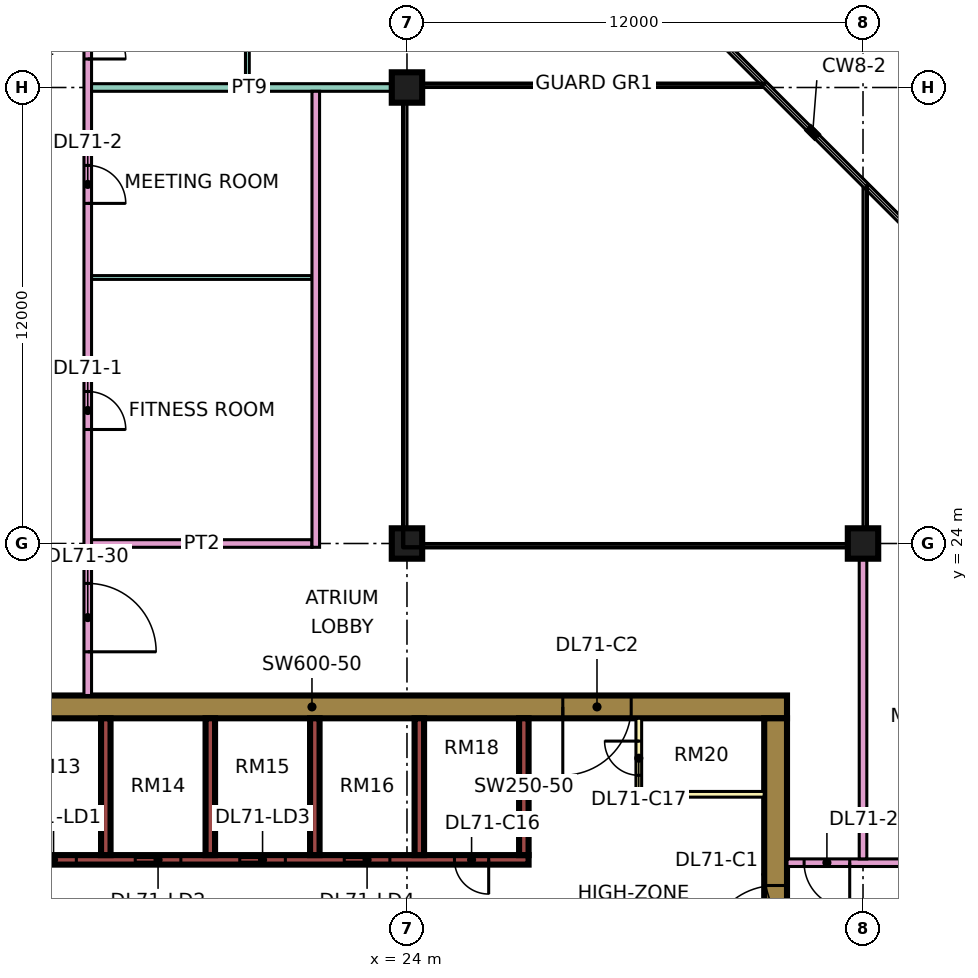
"""IFC4 building model, lengths in metres.
Left out: names, types, materials, properties, quantities, classifications, styles, units other than length and angle.
Written with IfcOpenShell. Run it as: python <this file> out.ifc"""

import sys

from ifc_helpers import new_model, si_unit, direction, frame, frame_2d, origin, origin_2d, place, context, subcontext, project, spatial, rectangle, extrude, element, fill, save


model = new_model("IFC4")
c1 = context("Model", 3, precision=1e-05, world=origin(), true_north=direction((0.0, 1.0)))
c2 = subcontext(c1, "Body", "Model", "MODEL_VIEW")
j1 = project(units=[si_unit("LENGTHUNIT", "METRE"), si_unit("PLANEANGLEUNIT", "RADIAN")], contexts=[c1])
p1 = place(None, origin())
s1 = spatial("IfcSite", under=j1, at=p1, CompositionType="ELEMENT")
p2 = place(p1, origin())
s2 = spatial("IfcBuilding", under=s1, at=p2, CompositionType="ELEMENT")
p3 = place(p2, frame((0.0, 0.0, 303.4)))
s3 = spatial("IfcBuildingStorey", under=s2, at=p3, CompositionType="ELEMENT", Elevation=303.4)
for number, where, z_axis, x_axis in (
    (1, (24.0, 24.0, 0.0), (0.0, 0.0, 1.0), (1.0, 0.0, 0.0)),
    (2, (24.0, 36.0, 0.0), (0.0, 0.0, 1.0), (1.0, 0.0, 0.0)),
    (3, (36.0, 24.0, 0.0), (0.0, 0.0, 1.0), (1.0, 0.0, 0.0)),
):
    element("IfcColumn", number, at=place(p3, frame(where, z_axis=z_axis, x_axis=x_axis)), inside=s3, PredefinedType="COLUMN", context=c2, shape_type="SweptSolid", body=[
        extrude(rectangle(XDim=0.8, YDim=0.8, at=origin_2d()), origin(), (0.0, 0.0, 1.0), 3.75),
    ])
p4 = place(p3, frame((9.0, 19.7, 0.0), z_axis=(0.0, 0.0, 1.0), x_axis=(1.0, 0.0, 0.0)))
e4 = element("IfcWall", 4, at=p4, inside=s3, PredefinedType="SHEAR", context=c2, shape_type="SweptSolid", body=[
    extrude(rectangle(XDim=25.0, YDim=0.6, at=frame_2d((12.5, 0.0))), origin(), (0.0, 0.0, 1.0), 3.75),
])
p5 = place(p4, frame((19.1, 0.0, 0.0)))
e5 = element("IfcOpeningElement", 5, at=p5, cuts=e4, PredefinedType="OPENING", context=c2, shape_type="SweptSolid", body=[
    extrude(rectangle(XDim=1.8, YDim=2.4, at=frame_2d((0.9, 1.2))), frame((0.0, 0.31, 0.0), z_axis=(0.0, -1.0, 0.0), x_axis=(1.0, 0.0, 0.0)), (0.0, 0.0, 1.0), 0.62),
])
p6 = place(p3, frame((33.7, 7.6, 0.0), z_axis=(0.0, 0.0, 1.0), x_axis=(0.0, 1.0, 0.0)))
e6 = element("IfcWall", 6, at=p6, inside=s3, PredefinedType="SHEAR", context=c2, shape_type="SweptSolid", body=[
    extrude(rectangle(XDim=11.8, YDim=0.6, at=frame_2d((5.9, 0.0))), origin(), (0.0, 0.0, 1.0), 3.75),
])
p7 = place(p6, frame((5.6, 0.0, 0.0)))
e7 = element("IfcOpeningElement", 7, at=p7, cuts=e6, PredefinedType="OPENING", context=c2, shape_type="SweptSolid", body=[
    extrude(rectangle(XDim=1.8, YDim=2.4, at=frame_2d((0.9, 1.2))), frame((0.0, 0.31, 0.0), z_axis=(0.0, -1.0, 0.0), x_axis=(1.0, 0.0, 0.0)), (0.0, 0.0, 1.0), 0.62),
])
p8 = place(p3, frame((13.45, 15.675, 0.0), z_axis=(0.0, 0.0, 1.0), x_axis=(1.0, 0.0, 0.0)))
e8 = element("IfcWall", 8, at=p8, inside=s3, PredefinedType="SHEAR", context=c2, shape_type="SweptSolid", body=[
    extrude(rectangle(XDim=13.75, YDim=0.25, at=frame_2d((6.875, 0.0))), origin(), (0.0, 0.0, 1.0), 3.75),
])
p9 = place(p8, frame((0.65, 0.0, 0.0)))
e9 = element("IfcOpeningElement", 9, at=p9, cuts=e8, PredefinedType="OPENING", context=c2, shape_type="SweptSolid", body=[
    extrude(rectangle(XDim=1.2, YDim=2.2, at=frame_2d((0.6, 1.1))), frame((0.0, 0.135, 0.0), z_axis=(0.0, -1.0, 0.0), x_axis=(1.0, 0.0, 0.0)), (0.0, 0.0, 1.0), 0.27),
])
p10 = place(p8, frame((3.4, 0.0, 0.0)))
e10 = element("IfcOpeningElement", 10, at=p10, cuts=e8, PredefinedType="OPENING", context=c2, shape_type="SweptSolid", body=[
    extrude(rectangle(XDim=1.2, YDim=2.2, at=frame_2d((0.6, 1.1))), frame((0.0, 0.135, 0.0), z_axis=(0.0, -1.0, 0.0), x_axis=(1.0, 0.0, 0.0)), (0.0, 0.0, 1.0), 0.27),
])
p11 = place(p8, frame((6.15, 0.0, 0.0)))
e11 = element("IfcOpeningElement", 11, at=p11, cuts=e8, PredefinedType="OPENING", context=c2, shape_type="SweptSolid", body=[
    extrude(rectangle(XDim=1.2, YDim=2.2, at=frame_2d((0.6, 1.1))), frame((0.0, 0.135, 0.0), z_axis=(0.0, -1.0, 0.0), x_axis=(1.0, 0.0, 0.0)), (0.0, 0.0, 1.0), 0.27),
])
p12 = place(p8, frame((8.9, 0.0, 0.0)))
e12 = element("IfcOpeningElement", 12, at=p12, cuts=e8, PredefinedType="OPENING", context=c2, shape_type="SweptSolid", body=[
    extrude(rectangle(XDim=1.2, YDim=2.2, at=frame_2d((0.6, 1.1))), frame((0.0, 0.135, 0.0), z_axis=(0.0, -1.0, 0.0), x_axis=(1.0, 0.0, 0.0)), (0.0, 0.0, 1.0), 0.27),
])
p13 = place(p8, frame((11.8, 0.0, 0.0)))
e13 = element("IfcOpeningElement", 13, at=p13, cuts=e8, PredefinedType="OPENING", context=c2, shape_type="SweptSolid", body=[
    extrude(rectangle(XDim=0.9, YDim=2.1, at=frame_2d((0.45, 1.05))), frame((0.0, 0.135, 0.0), z_axis=(0.0, -1.0, 0.0), x_axis=(1.0, 0.0, 0.0)), (0.0, 0.0, 1.0), 0.27),
])
for number, where, z_axis, x_axis in (
    (14, (16.075, 15.8, 0.0), (0.0, 0.0, 1.0), (0.0, 1.0, 0.0)),
    (15, (18.825, 15.8, 0.0), (0.0, 0.0, 1.0), (0.0, 1.0, 0.0)),
    (16, (21.575, 15.8, 0.0), (0.0, 0.0, 1.0), (0.0, 1.0, 0.0)),
    (17, (24.325, 15.8, 0.0), (0.0, 0.0, 1.0), (0.0, 1.0, 0.0)),
    (18, (27.075, 15.8, 0.0), (0.0, 0.0, 1.0), (0.0, 1.0, 0.0)),
):
    element("IfcWall", number, at=place(p3, frame(where, z_axis=z_axis, x_axis=x_axis)), inside=s3, PredefinedType="SHEAR", context=c2, shape_type="SweptSolid", body=[
        extrude(rectangle(XDim=3.6, YDim=0.25, at=frame_2d((1.8, 0.0))), origin(), (0.0, 0.0, 1.0), 3.75),
    ])
p14 = place(p3, frame((30.1, 17.4, 0.0), z_axis=(0.0, 0.0, 1.0), x_axis=(0.0, 1.0, 0.0)))
e19 = element("IfcWall", 19, at=p14, inside=s3, PredefinedType="PARTITIONING", context=c2, shape_type="SweptSolid", body=[
    extrude(rectangle(XDim=2.0, YDim=0.15, at=frame_2d((1.0, 0.0))), origin(), (0.0, 0.0, 1.0), 3.35),
])
p15 = place(p14, frame((0.5, 0.0, 0.0)))
e20 = element("IfcOpeningElement", 20, at=p15, cuts=e19, PredefinedType="OPENING", context=c2, shape_type="SweptSolid", body=[
    extrude(rectangle(XDim=0.9, YDim=2.1, at=frame_2d((0.45, 1.05))), frame((0.0, 0.085, 0.0), z_axis=(0.0, -1.0, 0.0), x_axis=(1.0, 0.0, 0.0)), (0.0, 0.0, 1.0), 0.17),
])
p16 = place(p3, frame((30.1, 17.4, 0.0), z_axis=(0.0, 0.0, 1.0), x_axis=(1.0, 0.0, 0.0)))
e21 = element("IfcWall", 21, at=p16, inside=s3, PredefinedType="PARTITIONING", context=c2, shape_type="SweptSolid", body=[
    extrude(rectangle(XDim=3.3, YDim=0.15, at=frame_2d((1.65, 0.0))), origin(), (0.0, 0.0, 1.0), 3.35),
])
p17 = place(p3, frame((15.6, 20.0, 0.0), z_axis=(0.0, 0.0, 1.0), x_axis=(0.0, 1.0, 0.0)))
e22 = element("IfcWall", 22, at=p17, inside=s3, PredefinedType="PARTITIONING", context=c2, shape_type="SweptSolid", body=[
    extrude(rectangle(XDim=27.775, YDim=0.2, at=frame_2d((13.887, 0.0))), origin(), (0.0, 0.0, 1.0), 3.35),
])
p18 = place(p17, frame((7.0, 0.0, 0.0)))
e23 = element("IfcOpeningElement", 23, at=p18, cuts=e22, PredefinedType="OPENING", context=c2, shape_type="SweptSolid", body=[
    extrude(rectangle(XDim=1.0, YDim=2.1, at=frame_2d((0.5, 1.05))), frame((0.0, 0.11, 0.0), z_axis=(0.0, -1.0, 0.0), x_axis=(1.0, 0.0, 0.0)), (0.0, 0.0, 1.0), 0.22),
])
p19 = place(p17, frame((12.95, 0.0, 0.0)))
e24 = element("IfcOpeningElement", 24, at=p19, cuts=e22, PredefinedType="OPENING", context=c2, shape_type="SweptSolid", body=[
    extrude(rectangle(XDim=1.0, YDim=2.1, at=frame_2d((0.5, 1.05))), frame((0.0, 0.11, 0.0), z_axis=(0.0, -1.0, 0.0), x_axis=(1.0, 0.0, 0.0)), (0.0, 0.0, 1.0), 0.22),
])
p20 = place(p17, frame((16.75, 0.0, 0.0)))
e25 = element("IfcOpeningElement", 25, at=p20, cuts=e22, PredefinedType="OPENING", context=c2, shape_type="SweptSolid", body=[
    extrude(rectangle(XDim=1.0, YDim=2.1, at=frame_2d((0.5, 1.05))), frame((0.0, 0.11, 0.0), z_axis=(0.0, -1.0, 0.0), x_axis=(1.0, 0.0, 0.0)), (0.0, 0.0, 1.0), 0.22),
])
p21 = place(p17, frame((1.15, 0.0, 0.0)))
e26 = element("IfcOpeningElement", 26, at=p21, cuts=e22, PredefinedType="OPENING", context=c2, shape_type="SweptSolid", body=[
    extrude(rectangle(XDim=1.8, YDim=2.1, at=frame_2d((0.9, 1.05))), frame((0.0, 0.11, 0.0), z_axis=(0.0, -1.0, 0.0), x_axis=(1.0, 0.0, 0.0)), (0.0, 0.0, 1.0), 0.22),
])
p22 = place(p17, frame((25.9, 0.0, 0.0)))
e27 = element("IfcOpeningElement", 27, at=p22, cuts=e22, PredefinedType="OPENING", context=c2, shape_type="SweptSolid", body=[
    extrude(rectangle(XDim=1.0, YDim=2.1, at=frame_2d((0.5, 1.05))), frame((0.0, 0.11, 0.0), z_axis=(0.0, -1.0, 0.0), x_axis=(1.0, 0.0, 0.0)), (0.0, 0.0, 1.0), 0.22),
])
p23 = place(p3, frame((15.7, 24.0, 0.0), z_axis=(0.0, 0.0, 1.0), x_axis=(1.0, 0.0, 0.0)))
e28 = element("IfcWall", 28, at=p23, inside=s3, PredefinedType="PARTITIONING", context=c2, shape_type="SweptSolid", body=[
    extrude(rectangle(XDim=5.8, YDim=0.2, at=frame_2d((2.9, 0.0))), origin(), (0.0, 0.0, 1.0), 3.35),
])
p24 = place(p3, frame((15.7, 31.0, 0.0), z_axis=(0.0, 0.0, 1.0), x_axis=(1.0, 0.0, 0.0)))
e29 = element("IfcWall", 29, at=p24, inside=s3, PredefinedType="PARTITIONING", context=c2, shape_type="SweptSolid", body=[
    extrude(rectangle(XDim=5.8, YDim=0.1, at=frame_2d((2.9, 0.0))), origin(), (0.0, 0.0, 1.0), 3.35),
])
p25 = place(p3, frame((15.7, 36.0, 0.0), z_axis=(0.0, 0.0, 1.0), x_axis=(1.0, 0.0, 0.0)))
e30 = element("IfcWall", 30, at=p25, inside=s3, PredefinedType="PARTITIONING", context=c2, shape_type="SweptSolid", body=[
    extrude(rectangle(XDim=8.3, YDim=0.2, at=frame_2d((4.15, 0.0))), origin(), (0.0, 0.0, 1.0), 3.35),
])
p26 = place(p3, frame((19.8, 36.1, 0.0), z_axis=(0.0, 0.0, 1.0), x_axis=(0.0, 1.0, 0.0)))
e31 = element("IfcWall", 31, at=p26, inside=s3, PredefinedType="PARTITIONING", context=c2, shape_type="SweptSolid", body=[
    extrude(rectangle(XDim=5.95, YDim=0.1, at=frame_2d((2.975, 0.0))), origin(), (0.0, 0.0, 1.0), 3.35),
])
p27 = place(p26, frame((0.95, 0.0, 0.0)))
e32 = element("IfcOpeningElement", 32, at=p27, cuts=e31, PredefinedType="OPENING", context=c2, shape_type="SweptSolid", body=[
    extrude(rectangle(XDim=0.9, YDim=2.1, at=frame_2d((0.45, 1.05))), frame((0.0, 0.06, 0.0), z_axis=(0.0, -1.0, 0.0), x_axis=(1.0, 0.0, 0.0)), (0.0, 0.0, 1.0), 0.12),
])
p28 = place(p3, frame((21.6, 23.9, 0.0), z_axis=(0.0, 0.0, 1.0), x_axis=(0.0, 1.0, 0.0)))
e33 = element("IfcWall", 33, at=p28, inside=s3, PredefinedType="PARTITIONING", context=c2, shape_type="SweptSolid", body=[
    extrude(rectangle(XDim=12.0, YDim=0.2, at=frame_2d((6.0, 0.0))), origin(), (0.0, 0.0, 1.0), 3.35),
])
p29 = place(p3, frame((34.0, 15.6, 0.0), z_axis=(0.0, 0.0, 1.0), x_axis=(1.0, 0.0, 0.0)))
e34 = element("IfcWall", 34, at=p29, inside=s3, PredefinedType="PARTITIONING", context=c2, shape_type="SweptSolid", body=[
    extrude(rectangle(XDim=10.35, YDim=0.2, at=frame_2d((5.175, 0.0))), origin(), (0.0, 0.0, 1.0), 3.35),
])
p30 = place(p29, frame((5.6, 0.0, 0.0)))
e35 = element("IfcOpeningElement", 35, at=p30, cuts=e34, PredefinedType="OPENING", context=c2, shape_type="SweptSolid", body=[
    extrude(rectangle(XDim=1.0, YDim=2.1, at=frame_2d((0.5, 1.05))), frame((0.0, 0.11, 0.0), z_axis=(0.0, -1.0, 0.0), x_axis=(1.0, 0.0, 0.0)), (0.0, 0.0, 1.0), 0.22),
])
p31 = place(p29, frame((0.45, 0.0, 0.0)))
e36 = element("IfcOpeningElement", 36, at=p31, cuts=e34, PredefinedType="OPENING", context=c2, shape_type="SweptSolid", body=[
    extrude(rectangle(XDim=1.2, YDim=2.1, at=frame_2d((0.6, 1.05))), frame((0.0, 0.11, 0.0), z_axis=(0.0, -1.0, 0.0), x_axis=(1.0, 0.0, 0.0)), (0.0, 0.0, 1.0), 0.22),
])
p32 = place(p3, frame((36.0, 15.7, 0.0), z_axis=(0.0, 0.0, 1.0), x_axis=(0.0, 1.0, 0.0)))
e37 = element("IfcWall", 37, at=p32, inside=s3, PredefinedType="PARTITIONING", context=c2, shape_type="SweptSolid", body=[
    extrude(rectangle(XDim=8.3, YDim=0.2, at=frame_2d((4.15, 0.0))), origin(), (0.0, 0.0, 1.0), 3.35),
])
p33 = place(p9, origin())
e38 = element("IfcDoor", 38, at=p33, inside=s3, OperationType="DOUBLE_DOOR_SLIDING", PredefinedType="DOOR", context=c2, shape_type="SweptSolid", body=[
    extrude(rectangle(XDim=1.2, YDim=2.2, at=frame_2d((0.6, 1.1))), frame((0.0, 0.025, 0.0), z_axis=(0.0, -1.0, 0.0), x_axis=(1.0, 0.0, 0.0)), (0.0, 0.0, 1.0), 0.05),
])
fill(e9, e38)
p34 = place(p10, origin())
e39 = element("IfcDoor", 39, at=p34, inside=s3, OperationType="DOUBLE_DOOR_SLIDING", PredefinedType="DOOR", context=c2, shape_type="SweptSolid", body=[
    extrude(rectangle(XDim=1.2, YDim=2.2, at=frame_2d((0.6, 1.1))), frame((0.0, 0.025, 0.0), z_axis=(0.0, -1.0, 0.0), x_axis=(1.0, 0.0, 0.0)), (0.0, 0.0, 1.0), 0.05),
])
fill(e10, e39)
p35 = place(p11, origin())
e40 = element("IfcDoor", 40, at=p35, inside=s3, OperationType="DOUBLE_DOOR_SLIDING", PredefinedType="DOOR", context=c2, shape_type="SweptSolid", body=[
    extrude(rectangle(XDim=1.2, YDim=2.2, at=frame_2d((0.6, 1.1))), frame((0.0, 0.025, 0.0), z_axis=(0.0, -1.0, 0.0), x_axis=(1.0, 0.0, 0.0)), (0.0, 0.0, 1.0), 0.05),
])
fill(e11, e40)
p36 = place(p12, origin())
e41 = element("IfcDoor", 41, at=p36, inside=s3, OperationType="DOUBLE_DOOR_SLIDING", PredefinedType="DOOR", context=c2, shape_type="SweptSolid", body=[
    extrude(rectangle(XDim=1.2, YDim=2.2, at=frame_2d((0.6, 1.1))), frame((0.0, 0.025, 0.0), z_axis=(0.0, -1.0, 0.0), x_axis=(1.0, 0.0, 0.0)), (0.0, 0.0, 1.0), 0.05),
])
fill(e12, e41)
p37 = place(p7, origin())
e42 = element("IfcDoor", 42, at=p37, inside=s3, OperationType="DOUBLE_DOOR_SINGLE_SWING", PredefinedType="DOOR", context=c2, shape_type="SweptSolid", body=[
    extrude(rectangle(XDim=1.8, YDim=2.4, at=frame_2d((0.9, 1.2))), frame((0.0, 0.025, 0.0), z_axis=(0.0, -1.0, 0.0), x_axis=(1.0, 0.0, 0.0)), (0.0, 0.0, 1.0), 0.05),
])
fill(e7, e42)
p38 = place(p5, frame((1.8, 0.0, 0.0), z_axis=(0.0, 0.0, 1.0), x_axis=(-1.0, 0.0, 0.0)))
e43 = element("IfcDoor", 43, at=p38, inside=s3, OperationType="DOUBLE_DOOR_SINGLE_SWING", PredefinedType="DOOR", context=c2, shape_type="SweptSolid", body=[
    extrude(rectangle(XDim=1.8, YDim=2.4, at=frame_2d((0.9, 1.2))), frame((0.0, 0.025, 0.0), z_axis=(0.0, -1.0, 0.0), x_axis=(1.0, 0.0, 0.0)), (0.0, 0.0, 1.0), 0.05),
])
fill(e5, e43)
p39 = place(p13, origin())
e44 = element("IfcDoor", 44, at=p39, inside=s3, OperationType="SINGLE_SWING_RIGHT", PredefinedType="DOOR", context=c2, shape_type="SweptSolid", body=[
    extrude(rectangle(XDim=0.9, YDim=2.1, at=frame_2d((0.45, 1.05))), frame((0.0, 0.025, 0.0), z_axis=(0.0, -1.0, 0.0), x_axis=(1.0, 0.0, 0.0)), (0.0, 0.0, 1.0), 0.05),
])
fill(e13, e44)
p40 = place(p15, frame((0.9, 0.0, 0.0), z_axis=(0.0, 0.0, 1.0), x_axis=(-1.0, 0.0, 0.0)))
e45 = element("IfcDoor", 45, at=p40, inside=s3, OperationType="SINGLE_SWING_RIGHT", PredefinedType="DOOR", context=c2, shape_type="SweptSolid", body=[
    extrude(rectangle(XDim=0.9, YDim=2.1, at=frame_2d((0.45, 1.05))), frame((0.0, 0.025, 0.0), z_axis=(0.0, -1.0, 0.0), x_axis=(1.0, 0.0, 0.0)), (0.0, 0.0, 1.0), 0.05),
])
fill(e20, e45)
p41 = place(p18, frame((1.0, 0.0, 0.0), z_axis=(0.0, 0.0, 1.0), x_axis=(-1.0, 0.0, 0.0)))
e46 = element("IfcDoor", 46, at=p41, inside=s3, OperationType="SINGLE_SWING_LEFT", PredefinedType="DOOR", context=c2, shape_type="SweptSolid", body=[
    extrude(rectangle(XDim=1.0, YDim=2.1, at=frame_2d((0.5, 1.05))), frame((0.0, 0.025, 0.0), z_axis=(0.0, -1.0, 0.0), x_axis=(1.0, 0.0, 0.0)), (0.0, 0.0, 1.0), 0.05),
])
fill(e23, e46)
p42 = place(p19, frame((1.0, 0.0, 0.0), z_axis=(0.0, 0.0, 1.0), x_axis=(-1.0, 0.0, 0.0)))
e47 = element("IfcDoor", 47, at=p42, inside=s3, OperationType="SINGLE_SWING_LEFT", PredefinedType="DOOR", context=c2, shape_type="SweptSolid", body=[
    extrude(rectangle(XDim=1.0, YDim=2.1, at=frame_2d((0.5, 1.05))), frame((0.0, 0.025, 0.0), z_axis=(0.0, -1.0, 0.0), x_axis=(1.0, 0.0, 0.0)), (0.0, 0.0, 1.0), 0.05),
])
fill(e24, e47)
p43 = place(p20, frame((1.0, 0.0, 0.0), z_axis=(0.0, 0.0, 1.0), x_axis=(-1.0, 0.0, 0.0)))
e48 = element("IfcDoor", 48, at=p43, inside=s3, OperationType="SINGLE_SWING_LEFT", PredefinedType="DOOR", context=c2, shape_type="SweptSolid", body=[
    extrude(rectangle(XDim=1.0, YDim=2.1, at=frame_2d((0.5, 1.05))), frame((0.0, 0.025, 0.0), z_axis=(0.0, -1.0, 0.0), x_axis=(1.0, 0.0, 0.0)), (0.0, 0.0, 1.0), 0.05),
])
fill(e25, e48)
p44 = place(p31, origin())
e49 = element("IfcDoor", 49, at=p44, inside=s3, OperationType="SINGLE_SWING_RIGHT", PredefinedType="DOOR", context=c2, shape_type="SweptSolid", body=[
    extrude(rectangle(XDim=1.2, YDim=2.1, at=frame_2d((0.6, 1.05))), frame((0.0, 0.025, 0.0), z_axis=(0.0, -1.0, 0.0), x_axis=(1.0, 0.0, 0.0)), (0.0, 0.0, 1.0), 0.05),
])
fill(e36, e49)
p45 = place(p21, frame((1.8, 0.0, 0.0), z_axis=(0.0, 0.0, 1.0), x_axis=(-1.0, 0.0, 0.0)))
e50 = element("IfcDoor", 50, at=p45, inside=s3, OperationType="DOUBLE_DOOR_SINGLE_SWING", PredefinedType="DOOR", context=c2, shape_type="SweptSolid", body=[
    extrude(rectangle(XDim=1.8, YDim=2.1, at=frame_2d((0.9, 1.05))), frame((0.0, 0.025, 0.0), z_axis=(0.0, -1.0, 0.0), x_axis=(1.0, 0.0, 0.0)), (0.0, 0.0, 1.0), 0.05),
])
fill(e26, e50)
save(model, sys.argv[1])
